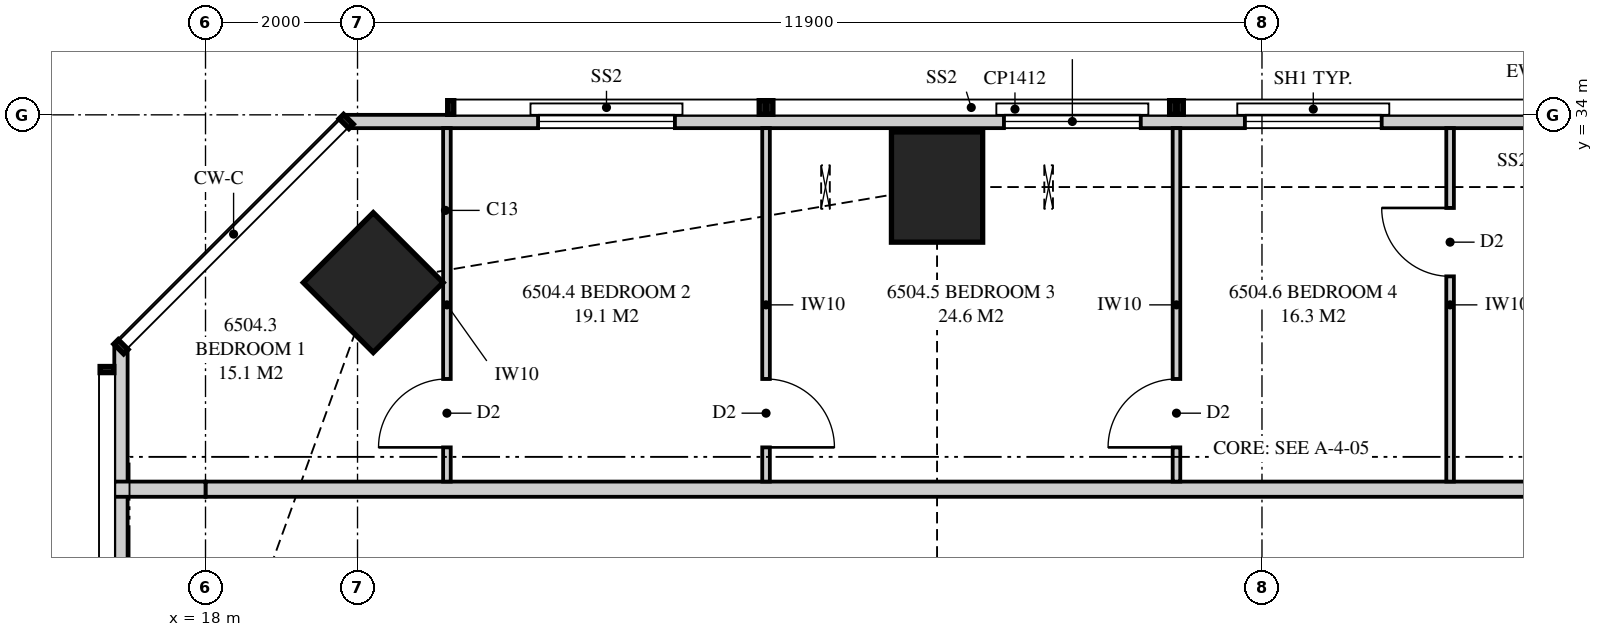
"""IFC4 building model, lengths in metres.
Left out: names, types, materials, properties, quantities, classifications, styles, units other than length and angle.
Written with IfcOpenShell. Run it as: python <this file> out.ifc"""

import sys

from ifc_helpers import new_model, si_unit, direction, frame, frame_2d, origin, origin_2d, place, context, subcontext, project, spatial, polyline, rectangle, outline, extrude, element, fill, save


model = new_model("IFC4")
c1 = context("Model", 3, precision=1e-05, world=origin(), true_north=direction((0.0, 1.0)))
c2 = subcontext(c1, "Body", "Model", "MODEL_VIEW")
j1 = project(units=[si_unit("LENGTHUNIT", "METRE"), si_unit("PLANEANGLEUNIT", "RADIAN")], contexts=[c1])
p1 = place(None, origin())
s1 = spatial("IfcSite", under=j1, at=p1, CompositionType="ELEMENT")
p2 = place(p1, origin())
s2 = spatial("IfcBuilding", under=s1, at=p2, CompositionType="ELEMENT")
p3 = place(p2, frame((0.0, 0.0, 238.95)))
s3 = spatial("IfcBuildingStorey", under=s2, at=p3, CompositionType="ELEMENT", Elevation=238.95)
p4 = place(p3, frame((27.625, 33.05, 0.0), z_axis=(0.0, 0.0, 1.0), x_axis=(0.0, 1.0, 0.0)))
e1 = element("IfcColumn", 1, at=p4, inside=s3, PredefinedType="COLUMN", context=c2, shape_type="SweptSolid", body=[
    extrude(rectangle(XDim=1.45, YDim=1.2, at=origin_2d()), origin(), (0.0, 0.0, 1.0), 3.5),
])
p5 = place(p3, frame((20.207, 31.793, 0.0), z_axis=(0.0, 0.0, 1.0), x_axis=(0.707106781187, 0.707106781187, 0.0)))
e2 = element("IfcColumn", 2, at=p5, inside=s3, PredefinedType="COLUMN", context=c2, shape_type="SweptSolid", body=[
    extrude(rectangle(XDim=1.3, YDim=1.3, at=origin_2d()), origin(), (0.0, 0.0, 1.0), 3.5),
])
p6 = place(p3, frame((53.449, 33.913, 0.0), z_axis=(0.0, 0.0, 1.0), x_axis=(-1.0, 0.0, 0.0)))
e3 = element("IfcWall", 3, at=p6, inside=s3, PredefinedType="SOLIDWALL", context=c2, shape_type="SweptSolid", body=[
    extrude(outline(polyline([(0.0, 0.0), (33.597, 0.0), (33.597, 3.26), (26.039, 3.26), (26.039, 2.3), (25.955, 2.3), (25.955, 3.26), (25.824, 3.26), (25.824, 2.3), (6.574, 2.3), (6.574, 3.26), (6.442, 3.26), (6.442, 2.3), (6.359, 2.3), (6.359, 3.26), (0.0, 3.26), (0.0, 0.0)])), frame((0.0, 0.087, 0.0), z_axis=(0.0, -1.0, 0.0), x_axis=(1.0, 0.0, 0.0)), (0.0, 0.0, 1.0), 0.175),
])
p7 = place(p6, frame((0.6, 0.0, 0.0)))
e4 = element("IfcOpeningElement", 4, at=p7, cuts=e3, PredefinedType="OPENING", context=c2, shape_type="SweptSolid", body=[
    extrude(rectangle(XDim=1.8, YDim=2.25, at=frame_2d((0.9, 1.125))), frame((0.0, 0.097, 0.0), z_axis=(0.0, -1.0, 0.0), x_axis=(1.0, 0.0, 0.0)), (0.0, 0.0, 1.0), 0.195),
])
p8 = place(p6, frame((9.76, 0.0, 0.4)))
e5 = element("IfcOpeningElement", 5, at=p8, cuts=e3, PredefinedType="OPENING", context=c2, shape_type="SweptSolid", body=[
    extrude(rectangle(XDim=2.4, YDim=1.85, at=frame_2d((1.2, 0.925))), frame((0.0, 0.097, 0.0), z_axis=(0.0, -1.0, 0.0), x_axis=(1.0, 0.0, 0.0)), (0.0, 0.0, 1.0), 0.195),
])
p9 = place(p6, frame((19.974, 0.0, 0.4)))
e6 = element("IfcOpeningElement", 6, at=p9, cuts=e3, PredefinedType="OPENING", context=c2, shape_type="SweptSolid", body=[
    extrude(rectangle(XDim=1.8, YDim=1.85, at=frame_2d((0.9, 0.925))), frame((0.0, 0.097, 0.0), z_axis=(0.0, -1.0, 0.0), x_axis=(1.0, 0.0, 0.0)), (0.0, 0.0, 1.0), 0.195),
])
p10 = place(p6, frame((23.144, 0.0, 0.4)))
e7 = element("IfcOpeningElement", 7, at=p10, cuts=e3, PredefinedType="OPENING", context=c2, shape_type="SweptSolid", body=[
    extrude(rectangle(XDim=1.8, YDim=1.85, at=frame_2d((0.9, 0.925))), frame((0.0, 0.097, 0.0), z_axis=(0.0, -1.0, 0.0), x_axis=(1.0, 0.0, 0.0)), (0.0, 0.0, 1.0), 0.195),
])
p11 = place(p6, frame((29.273, 0.0, 0.4)))
e8 = element("IfcOpeningElement", 8, at=p11, cuts=e3, PredefinedType="OPENING", context=c2, shape_type="SweptSolid", body=[
    extrude(rectangle(XDim=1.8, YDim=1.85, at=frame_2d((0.9, 0.925))), frame((0.0, 0.097, 0.0), z_axis=(0.0, -1.0, 0.0), x_axis=(1.0, 0.0, 0.0)), (0.0, 0.0, 1.0), 0.195),
])
p12 = place(p3, frame((16.887, 30.949, 0.0), z_axis=(0.0, 0.0, 1.0), x_axis=(0.0, -1.0, 0.0)))
e9 = element("IfcWall", 9, at=p12, inside=s3, PredefinedType="SOLIDWALL", context=c2, shape_type="SweptSolid", body=[
    extrude(outline(polyline([(0.0, 0.0), (27.897, 0.0), (27.897, 3.26), (18.148, 3.26), (18.148, 2.3), (18.125, 2.3), (18.125, 3.26), (17.949, 3.26), (17.949, 2.3), (5.949, 2.3), (5.949, 3.26), (0.0, 3.26), (0.0, 0.0)])), frame((0.0, 0.087, 0.0), z_axis=(0.0, -1.0, 0.0), x_axis=(1.0, 0.0, 0.0)), (0.0, 0.0, 1.0), 0.175),
])
p13 = place(p12, frame((11.849, 0.0, 0.4)))
e10 = element("IfcOpeningElement", 10, at=p13, cuts=e9, PredefinedType="OPENING", context=c2, shape_type="SweptSolid", body=[
    extrude(rectangle(XDim=1.2, YDim=1.85, at=frame_2d((0.6, 0.925))), frame((0.0, 0.097, 0.0), z_axis=(0.0, -1.0, 0.0), x_axis=(1.0, 0.0, 0.0)), (0.0, 0.0, 1.0), 0.195),
])
p14 = place(p12, frame((24.311, 0.0, 0.4)))
e11 = element("IfcOpeningElement", 11, at=p14, cuts=e9, PredefinedType="OPENING", context=c2, shape_type="SweptSolid", body=[
    extrude(rectangle(XDim=2.4, YDim=1.85, at=frame_2d((1.2, 0.925))), frame((0.0, 0.097, 0.0), z_axis=(0.0, -1.0, 0.0), x_axis=(1.0, 0.0, 0.0)), (0.0, 0.0, 1.0), 0.195),
])
p15 = place(p3, frame((18.0, 29.075, 0.0), z_axis=(0.0, 0.0, 1.0), x_axis=(1.0, 0.0, 0.0)))
e12 = element("IfcWall", 12, at=p15, inside=s3, PredefinedType="PARTITIONING", context=c2, shape_type="SweptSolid", body=[
    extrude(outline(polyline([(0.0, 0.0), (27.875, 0.0), (27.875, 3.26), (27.875, 2.66), (27.565, 2.66), (27.565, 3.26), (20.56, 3.26), (20.56, 2.66), (17.94, 2.66), (17.94, 3.26), (10.935, 3.26), (10.935, 2.66), (8.315, 2.66), (8.315, 3.26), (2.192, 3.26), (2.192, 2.3), (0.256, 2.3), (0.256, 3.26), (0.0, 3.26), (0.0, 0.0)])), frame((0.0, 0.1, 0.0), z_axis=(0.0, -1.0, 0.0), x_axis=(1.0, 0.0, 0.0)), (0.0, 0.0, 1.0), 0.2),
])
p16 = place(p15, frame((18.75, 0.0, 0.0)))
e13 = element("IfcOpeningElement", 13, at=p16, cuts=e12, PredefinedType="OPENING", context=c2, shape_type="SweptSolid", body=[
    extrude(rectangle(XDim=1.05, YDim=2.2, at=frame_2d((0.525, 1.1))), frame((0.0, 0.11, 0.0), z_axis=(0.0, -1.0, 0.0), x_axis=(1.0, 0.0, 0.0)), (0.0, 0.0, 1.0), 0.22),
])
p17 = place(p3, frame((21.176, 33.825, 0.0), z_axis=(0.0, 0.0, 1.0), x_axis=(0.0, -1.0, 0.0)))
e14 = element("IfcWall", 14, at=p17, inside=s3, PredefinedType="PARTITIONING", context=c2, shape_type="SweptSolid", body=[
    extrude(outline(polyline([(0.0, 0.0), (4.65, 0.0), (4.65, 3.26), (2.74, 3.26), (2.74, 2.3), (0.996, 2.3), (0.996, 3.26), (0.0, 3.26), (0.0, 0.0)])), frame((0.0, 0.05, 0.0), z_axis=(0.0, -1.0, 0.0), x_axis=(1.0, 0.0, 0.0)), (0.0, 0.0, 1.0), 0.1),
])
p18 = place(p17, frame((3.3, 0.0, 0.0)))
e15 = element("IfcOpeningElement", 15, at=p18, cuts=e14, PredefinedType="OPENING", context=c2, shape_type="SweptSolid", body=[
    extrude(rectangle(XDim=0.9, YDim=2.1, at=frame_2d((0.45, 1.05))), frame((0.0, 0.06, 0.0), z_axis=(0.0, -1.0, 0.0), x_axis=(1.0, 0.0, 0.0)), (0.0, 0.0, 1.0), 0.12),
])
p19 = place(p3, frame((25.375, 33.825, 0.0), z_axis=(0.0, 0.0, 1.0), x_axis=(0.0, -1.0, 0.0)))
e16 = element("IfcWall", 16, at=p19, inside=s3, PredefinedType="PARTITIONING", context=c2, shape_type="SweptSolid", body=[
    extrude(outline(polyline([(0.0, 0.0), (4.65, 0.0), (4.65, 3.26), (2.029, 3.26), (2.029, 2.3), (0.284, 2.3), (0.284, 3.26), (0.0, 3.26), (0.0, 0.0)])), frame((0.0, 0.05, 0.0), z_axis=(0.0, -1.0, 0.0), x_axis=(1.0, 0.0, 0.0)), (0.0, 0.0, 1.0), 0.1),
])
p20 = place(p19, frame((3.3, 0.0, 0.0)))
e17 = element("IfcOpeningElement", 17, at=p20, cuts=e16, PredefinedType="OPENING", context=c2, shape_type="SweptSolid", body=[
    extrude(rectangle(XDim=0.9, YDim=2.1, at=frame_2d((0.45, 1.05))), frame((0.0, 0.06, 0.0), z_axis=(0.0, -1.0, 0.0), x_axis=(1.0, 0.0, 0.0)), (0.0, 0.0, 1.0), 0.12),
])
p21 = place(p3, frame((30.775, 33.825, 0.0), z_axis=(0.0, 0.0, 1.0), x_axis=(0.0, -1.0, 0.0)))
e18 = element("IfcWall", 18, at=p21, inside=s3, PredefinedType="PARTITIONING", context=c2, shape_type="SweptSolid", body=[
    extrude(outline(polyline([(0.0, 0.0), (4.65, 0.0), (4.65, 3.26), (1.635, 3.26), (1.635, 2.3), (0.0, 2.3), (0.0, 3.26), (0.0, 0.0)])), frame((0.0, 0.05, 0.0), z_axis=(0.0, -1.0, 0.0), x_axis=(1.0, 0.0, 0.0)), (0.0, 0.0, 1.0), 0.1),
])
p22 = place(p21, frame((3.3, 0.0, 0.0)))
e19 = element("IfcOpeningElement", 19, at=p22, cuts=e18, PredefinedType="OPENING", context=c2, shape_type="SweptSolid", body=[
    extrude(rectangle(XDim=0.9, YDim=2.1, at=frame_2d((0.45, 1.05))), frame((0.0, 0.06, 0.0), z_axis=(0.0, -1.0, 0.0), x_axis=(1.0, 0.0, 0.0)), (0.0, 0.0, 1.0), 0.12),
])
p23 = place(p3, frame((34.375, 33.825, 0.0), z_axis=(0.0, 0.0, 1.0), x_axis=(0.0, -1.0, 0.0)))
e20 = element("IfcWall", 20, at=p23, inside=s3, PredefinedType="PARTITIONING", context=c2, shape_type="SweptSolid", body=[
    extrude(outline(polyline([(0.0, 0.0), (4.65, 0.0), (4.65, 3.26), (1.635, 3.26), (1.635, 2.3), (0.0, 2.3), (0.0, 3.26), (0.0, 0.0)])), frame((0.0, 0.05, 0.0), z_axis=(0.0, -1.0, 0.0), x_axis=(1.0, 0.0, 0.0)), (0.0, 0.0, 1.0), 0.1),
])
p24 = place(p23, frame((1.05, 0.0, 0.0)))
e21 = element("IfcOpeningElement", 21, at=p24, cuts=e20, PredefinedType="OPENING", context=c2, shape_type="SweptSolid", body=[
    extrude(rectangle(XDim=0.9, YDim=2.1, at=frame_2d((0.45, 1.05))), frame((0.0, 0.06, 0.0), z_axis=(0.0, -1.0, 0.0), x_axis=(1.0, 0.0, 0.0)), (0.0, 0.0, 1.0), 0.12),
])
p25 = place(p3, frame((16.8, 29.075, 0.0), z_axis=(0.0, 0.0, 1.0), x_axis=(1.0, 0.0, 0.0)))
e22 = element("IfcWall", 22, at=p25, inside=s3, PredefinedType="PARTITIONING", context=c2, shape_type="SweptSolid", body=[
    extrude(rectangle(XDim=1.2, YDim=0.2, at=frame_2d((0.6, 0.0))), origin(), (0.0, 0.0, 1.0), 3.26),
])
p26 = place(p9, origin())
e23 = element("IfcWindow", 23, at=p26, inside=s3, PartitioningType="SINGLE_PANEL", PredefinedType="WINDOW", context=c2, shape_type="SweptSolid", body=[
    extrude(rectangle(XDim=1.8, YDim=1.85, at=frame_2d((0.9, 0.925))), frame((0.0, 0.03, 0.0), z_axis=(0.0, -1.0, 0.0), x_axis=(1.0, 0.0, 0.0)), (0.0, 0.0, 1.0), 0.06),
])
fill(e6, e23)
p27 = place(p10, origin())
e24 = element("IfcWindow", 24, at=p27, inside=s3, PartitioningType="SINGLE_PANEL", PredefinedType="WINDOW", context=c2, shape_type="SweptSolid", body=[
    extrude(rectangle(XDim=1.8, YDim=1.85, at=frame_2d((0.9, 0.925))), frame((0.0, 0.03, 0.0), z_axis=(0.0, -1.0, 0.0), x_axis=(1.0, 0.0, 0.0)), (0.0, 0.0, 1.0), 0.06),
])
fill(e7, e24)
p28 = place(p11, origin())
e25 = element("IfcWindow", 25, at=p28, inside=s3, PartitioningType="SINGLE_PANEL", PredefinedType="WINDOW", context=c2, shape_type="SweptSolid", body=[
    extrude(rectangle(XDim=1.8, YDim=1.85, at=frame_2d((0.9, 0.925))), frame((0.0, 0.03, 0.0), z_axis=(0.0, -1.0, 0.0), x_axis=(1.0, 0.0, 0.0)), (0.0, 0.0, 1.0), 0.06),
])
fill(e8, e25)
p29 = place(p18, frame((0.9, 0.0, 0.0), z_axis=(0.0, 0.0, 1.0), x_axis=(-1.0, 0.0, 0.0)))
e26 = element("IfcDoor", 26, at=p29, inside=s3, OperationType="SINGLE_SWING_LEFT", PredefinedType="DOOR", context=c2, shape_type="SweptSolid", body=[
    extrude(rectangle(XDim=0.9, YDim=2.1, at=frame_2d((0.45, 1.05))), frame((0.0, 0.025, 0.0), z_axis=(0.0, -1.0, 0.0), x_axis=(1.0, 0.0, 0.0)), (0.0, 0.0, 1.0), 0.05),
])
fill(e15, e26)
p30 = place(p20, origin())
e27 = element("IfcDoor", 27, at=p30, inside=s3, OperationType="SINGLE_SWING_RIGHT", PredefinedType="DOOR", context=c2, shape_type="SweptSolid", body=[
    extrude(rectangle(XDim=0.9, YDim=2.1, at=frame_2d((0.45, 1.05))), frame((0.0, 0.025, 0.0), z_axis=(0.0, -1.0, 0.0), x_axis=(1.0, 0.0, 0.0)), (0.0, 0.0, 1.0), 0.05),
])
fill(e17, e27)
p31 = place(p22, frame((0.9, 0.0, 0.0), z_axis=(0.0, 0.0, 1.0), x_axis=(-1.0, 0.0, 0.0)))
e28 = element("IfcDoor", 28, at=p31, inside=s3, OperationType="SINGLE_SWING_LEFT", PredefinedType="DOOR", context=c2, shape_type="SweptSolid", body=[
    extrude(rectangle(XDim=0.9, YDim=2.1, at=frame_2d((0.45, 1.05))), frame((0.0, 0.025, 0.0), z_axis=(0.0, -1.0, 0.0), x_axis=(1.0, 0.0, 0.0)), (0.0, 0.0, 1.0), 0.05),
])
fill(e19, e28)
p32 = place(p24, frame((0.9, 0.0, 0.0), z_axis=(0.0, 0.0, 1.0), x_axis=(-1.0, 0.0, 0.0)))
e29 = element("IfcDoor", 29, at=p32, inside=s3, OperationType="SINGLE_SWING_RIGHT", PredefinedType="DOOR", context=c2, shape_type="SweptSolid", body=[
    extrude(rectangle(XDim=0.9, YDim=2.1, at=frame_2d((0.45, 1.05))), frame((0.0, 0.025, 0.0), z_axis=(0.0, -1.0, 0.0), x_axis=(1.0, 0.0, 0.0)), (0.0, 0.0, 1.0), 0.05),
])
fill(e21, e29)
save(model, sys.argv[1])
